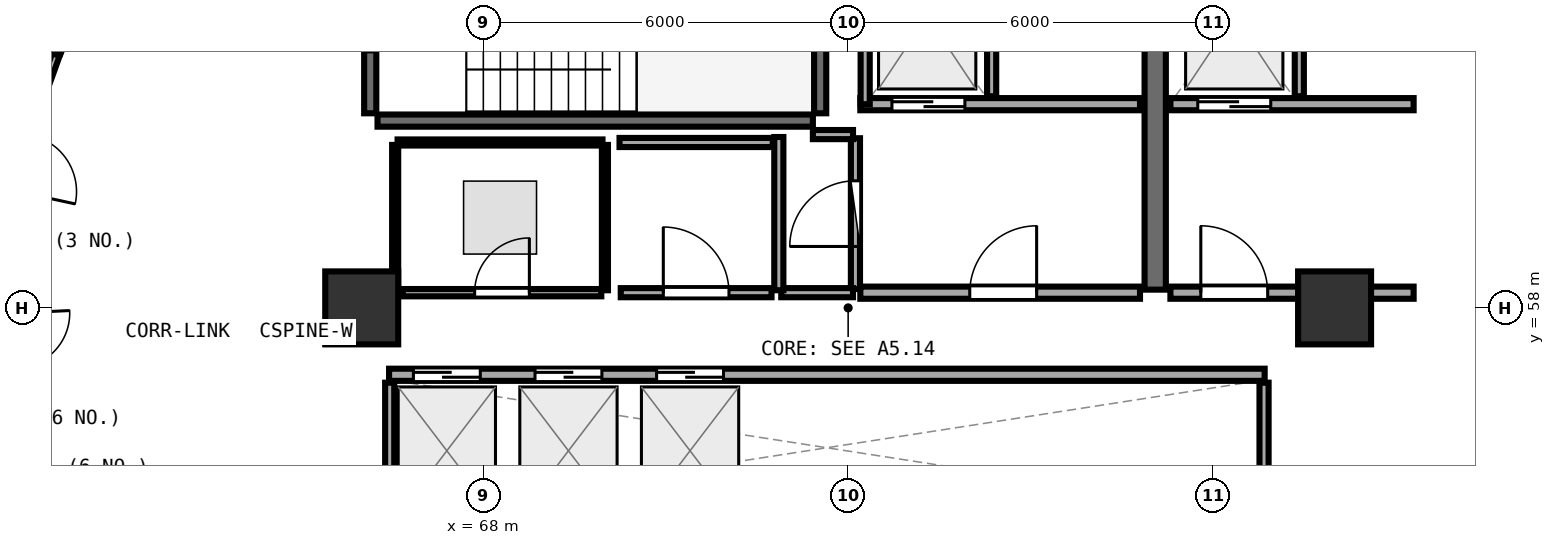
"""IFC4 building model, lengths in metres.
Left out: names, types, materials, properties, quantities, classifications, styles, units other than length and angle.
Written with IfcOpenShell. Run it as: python <this file> out.ifc"""

import sys

from ifc_helpers import new_model, si_unit, direction, frame, frame_2d, origin, origin_2d, place, context, subcontext, project, spatial, rectangle, extrude, element, fill, save


model = new_model("IFC4")
c1 = context("Model", 3, precision=1e-05, world=origin(), true_north=direction((0.0, 1.0)))
c2 = subcontext(c1, "Body", "Model", "MODEL_VIEW")
j1 = project(units=[si_unit("LENGTHUNIT", "METRE"), si_unit("PLANEANGLEUNIT", "RADIAN")], contexts=[c1])
p1 = place(None, origin())
s1 = spatial("IfcSite", under=j1, at=p1, CompositionType="ELEMENT")
p2 = place(p1, origin())
s2 = spatial("IfcBuilding", under=s1, at=p2, CompositionType="ELEMENT")
p3 = place(p2, frame((0.0, 0.0, 161.85)))
s3 = spatial("IfcBuildingStorey", under=s2, at=p3, CompositionType="ELEMENT", Elevation=161.85)
for number, where, z_axis, x_axis in (
    (1, (82.0, 58.0, 0.0), (0.0, 0.0, 1.0), (1.0, 0.0, 0.0)),
    (2, (66.0, 58.0, 0.0), (0.0, 0.0, 1.0), (1.0, 0.0, 0.0)),
):
    element("IfcColumn", number, at=place(p3, frame(where, z_axis=z_axis, x_axis=x_axis)), inside=s3, PredefinedType="PILASTER", context=c2, shape_type="SweptSolid", body=[
        extrude(rectangle(XDim=1.2, YDim=1.2, at=origin_2d()), origin(), (0.0, 0.0, 1.0), 3.75),
    ])
p4 = place(p3, frame((66.26, 61.08, 0.0), z_axis=(0.0, 0.0, 1.0), x_axis=(1.0, 0.0, 0.0)))
e3 = element("IfcWall", 3, at=p4, inside=s3, PredefinedType="SHEAR", context=c2, shape_type="SweptSolid", body=[
    extrude(rectangle(XDim=7.16, YDim=0.2, at=frame_2d((3.58, 0.0))), origin(), (0.0, 0.0, 1.0), 3.49),
])
p5 = place(p3, frame((73.54, 61.2, 0.0), z_axis=(0.0, 0.0, 1.0), x_axis=(0.0, 1.0, 0.0)))
e4 = element("IfcWall", 4, at=p5, inside=s3, PredefinedType="SHEAR", context=c2, shape_type="SweptSolid", body=[
    extrude(rectangle(XDim=3.07, YDim=0.2, at=frame_2d((1.535, 0.0))), origin(), (0.0, 0.0, 1.0), 3.49),
])
p6 = place(p3, frame((66.14, 64.27, 0.0), z_axis=(0.0, 0.0, 1.0), x_axis=(0.0, -1.0, 0.0)))
e5 = element("IfcWall", 5, at=p6, inside=s3, PredefinedType="SHEAR", context=c2, shape_type="SweptSolid", body=[
    extrude(rectangle(XDim=3.07, YDim=0.2, at=frame_2d((1.535, 0.0))), origin(), (0.0, 0.0, 1.0), 3.49),
])
p7 = place(p6, frame((1.01, 0.0, 0.0)))
e6 = element("IfcOpeningElement", 6, at=p7, cuts=e5, PredefinedType="OPENING", context=c2, shape_type="SweptSolid", body=[
    extrude(rectangle(XDim=1.05, YDim=2.1, at=frame_2d((0.525, 1.05))), frame((0.0, 0.11, 0.0), z_axis=(0.0, -1.0, 0.0), x_axis=(1.0, 0.0, 0.0)), (0.0, 0.0, 1.0), 0.22),
])
p8 = place(p3, frame((79.05, 58.3, 0.0), z_axis=(0.0, 0.0, 1.0), x_axis=(0.0, 1.0, 0.0)))
e7 = element("IfcWall", 7, at=p8, inside=s3, PredefinedType="SHEAR", context=c2, shape_type="SweptSolid", body=[
    extrude(rectangle(XDim=6.3, YDim=0.35, at=frame_2d((3.15, 0.0))), origin(), (0.0, 0.0, 1.0), 3.49),
])
p9 = place(p3, frame((74.2, 61.35, 0.0), z_axis=(0.0, 0.0, 1.0), x_axis=(1.0, 0.0, 0.0)))
e8 = element("IfcWall", 8, at=p9, inside=s3, PredefinedType="SOLIDWALL", context=c2, shape_type="SweptSolid", body=[
    extrude(rectangle(XDim=4.6, YDim=0.2, at=frame_2d((2.3, 0.0))), origin(), (0.0, 0.0, 1.0), 3.48),
])
p10 = place(p9, frame((0.52, 0.0, 0.0)))
e9 = element("IfcOpeningElement", 9, at=p10, cuts=e8, PredefinedType="OPENING", context=c2, shape_type="SweptSolid", body=[
    extrude(rectangle(XDim=1.2, YDim=2.15, at=frame_2d((0.6, 1.075))), frame((0.0, 0.11, 0.0), z_axis=(0.0, -1.0, 0.0), x_axis=(1.0, 0.0, 0.0)), (0.0, 0.0, 1.0), 0.22),
])
p11 = place(p3, frame((74.28, 61.35, 0.0), z_axis=(0.0, 0.0, 1.0), x_axis=(0.0, 1.0, 0.0)))
e10 = element("IfcWall", 10, at=p11, inside=s3, PredefinedType="PARTITIONING", context=c2, shape_type="SweptSolid", body=[
    extrude(rectangle(XDim=2.97, YDim=0.15, at=frame_2d((1.485, 0.0))), origin(), (0.0, 0.0, 1.0), 3.48),
])
p12 = place(p3, frame((76.36, 61.48, 0.0), z_axis=(0.0, 0.0, 1.0), x_axis=(0.0, 1.0, 0.0)))
e11 = element("IfcWall", 11, at=p12, inside=s3, PredefinedType="PARTITIONING", context=c2, shape_type="SweptSolid", body=[
    extrude(rectangle(XDim=2.84, YDim=0.15, at=frame_2d((1.42, 0.0))), origin(), (0.0, 0.0, 1.0), 3.48),
])
p13 = place(p3, frame((79.3, 61.35, 0.0), z_axis=(0.0, 0.0, 1.0), x_axis=(1.0, 0.0, 0.0)))
e12 = element("IfcWall", 12, at=p13, inside=s3, PredefinedType="SOLIDWALL", context=c2, shape_type="SweptSolid", body=[
    extrude(rectangle(XDim=4.0, YDim=0.2, at=frame_2d((2.0, 0.0))), origin(), (0.0, 0.0, 1.0), 2.775),
])
p14 = place(p13, frame((0.45, 0.0, 0.0)))
e13 = element("IfcOpeningElement", 13, at=p14, cuts=e12, PredefinedType="OPENING", context=c2, shape_type="SweptSolid", body=[
    extrude(rectangle(XDim=1.2, YDim=2.15, at=frame_2d((0.6, 1.075))), frame((0.0, 0.11, 0.0), z_axis=(0.0, -1.0, 0.0), x_axis=(1.0, 0.0, 0.0)), (0.0, 0.0, 1.0), 0.22),
])
p15 = place(p3, frame((81.42, 61.48, 0.0), z_axis=(0.0, 0.0, 1.0), x_axis=(0.0, 1.0, 0.0)))
e14 = element("IfcWall", 14, at=p15, inside=s3, PredefinedType="PARTITIONING", context=c2, shape_type="SweptSolid", body=[
    extrude(rectangle(XDim=2.84, YDim=0.15, at=frame_2d((1.42, 0.0))), origin(), (0.0, 0.0, 1.0), 3.48),
])
p16 = place(p3, frame((74.2, 58.25, 0.0), z_axis=(0.0, 0.0, 1.0), x_axis=(1.0, 0.0, 0.0)))
e15 = element("IfcWall", 15, at=p16, inside=s3, PredefinedType="SOLIDWALL", context=c2, shape_type="SweptSolid", body=[
    extrude(rectangle(XDim=4.6, YDim=0.2, at=frame_2d((2.3, 0.0))), origin(), (0.0, 0.0, 1.0), 3.48),
])
p17 = place(p16, frame((1.8, 0.0, 0.0)))
e16 = element("IfcOpeningElement", 16, at=p17, cuts=e15, PredefinedType="OPENING", context=c2, shape_type="SweptSolid", body=[
    extrude(rectangle(XDim=1.1, YDim=2.1, at=frame_2d((0.55, 1.05))), frame((0.0, 0.11, 0.0), z_axis=(0.0, -1.0, 0.0), x_axis=(1.0, 0.0, 0.0)), (0.0, 0.0, 1.0), 0.22),
])
p18 = place(p3, frame((79.3, 58.25, 0.0), z_axis=(0.0, 0.0, 1.0), x_axis=(1.0, 0.0, 0.0)))
e17 = element("IfcWall", 17, at=p18, inside=s3, PredefinedType="SOLIDWALL", context=c2, shape_type="SweptSolid", body=[
    extrude(rectangle(XDim=4.0, YDim=0.2, at=frame_2d((2.0, 0.0))), origin(), (0.0, 0.0, 1.0), 2.775),
])
p19 = place(p18, frame((0.5, 0.0, 0.0)))
e18 = element("IfcOpeningElement", 18, at=p19, cuts=e17, PredefinedType="OPENING", context=c2, shape_type="SweptSolid", body=[
    extrude(rectangle(XDim=1.1, YDim=2.1, at=frame_2d((0.55, 1.05))), frame((0.0, 0.11, 0.0), z_axis=(0.0, -1.0, 0.0), x_axis=(1.0, 0.0, 0.0)), (0.0, 0.0, 1.0), 0.22),
])
p20 = place(p3, frame((66.45, 56.9, 0.0), z_axis=(0.0, 0.0, 1.0), x_axis=(1.0, 0.0, 0.0)))
e19 = element("IfcWall", 19, at=p20, inside=s3, PredefinedType="SOLIDWALL", context=c2, shape_type="SweptSolid", body=[
    extrude(rectangle(XDim=14.4, YDim=0.2, at=frame_2d((7.2, 0.0))), origin(), (0.0, 0.0, 1.0), 3.48),
])
p21 = place(p20, frame((0.4, 0.0, 0.0)))
e20 = element("IfcOpeningElement", 20, at=p21, cuts=e19, PredefinedType="OPENING", context=c2, shape_type="SweptSolid", body=[
    extrude(rectangle(XDim=1.1, YDim=2.1, at=frame_2d((0.55, 1.05))), frame((0.0, 0.11, 0.0), z_axis=(0.0, -1.0, 0.0), x_axis=(1.0, 0.0, 0.0)), (0.0, 0.0, 1.0), 0.22),
])
p22 = place(p20, frame((2.4, 0.0, 0.0)))
e21 = element("IfcOpeningElement", 21, at=p22, cuts=e19, PredefinedType="OPENING", context=c2, shape_type="SweptSolid", body=[
    extrude(rectangle(XDim=1.1, YDim=2.1, at=frame_2d((0.55, 1.05))), frame((0.0, 0.11, 0.0), z_axis=(0.0, -1.0, 0.0), x_axis=(1.0, 0.0, 0.0)), (0.0, 0.0, 1.0), 0.22),
])
p23 = place(p20, frame((4.4, 0.0, 0.0)))
e22 = element("IfcOpeningElement", 22, at=p23, cuts=e19, PredefinedType="OPENING", context=c2, shape_type="SweptSolid", body=[
    extrude(rectangle(XDim=1.1, YDim=2.1, at=frame_2d((0.55, 1.05))), frame((0.0, 0.11, 0.0), z_axis=(0.0, -1.0, 0.0), x_axis=(1.0, 0.0, 0.0)), (0.0, 0.0, 1.0), 0.22),
])
for number, where, z_axis, x_axis in (
    (23, (66.46, 54.48, 0.0), (0.0, 0.0, 1.0), (0.0, 1.0, 0.0)),
    (24, (80.84, 54.48, 0.0), (0.0, 0.0, 1.0), (0.0, 1.0, 0.0)),
):
    element("IfcWall", number, at=place(p3, frame(where, z_axis=z_axis, x_axis=x_axis)), inside=s3, PredefinedType="PARTITIONING", context=c2, shape_type="SweptSolid", body=[
        extrude(rectangle(XDim=2.29, YDim=0.15, at=frame_2d((1.145, 0.0))), origin(), (0.0, 0.0, 1.0), 3.48),
    ])
p24 = place(p3, frame((74.12, 58.31, 0.0), z_axis=(0.0, 0.0, 1.0), x_axis=(0.0, 1.0, 0.0)))
e25 = element("IfcWall", 25, at=p24, inside=s3, PredefinedType="PARTITIONING", context=c2, shape_type="SweptSolid", body=[
    extrude(rectangle(XDim=2.48, YDim=0.15, at=frame_2d((1.24, 0.0))), origin(), (0.0, 0.0, 1.0), 3.48),
])
p25 = place(p24, frame((0.7, 0.0, 0.0)))
e26 = element("IfcOpeningElement", 26, at=p25, cuts=e25, PredefinedType="OPENING", context=c2, shape_type="SweptSolid", body=[
    extrude(rectangle(XDim=1.08, YDim=2.1, at=frame_2d((0.54, 1.05))), frame((0.0, 0.085, 0.0), z_axis=(0.0, -1.0, 0.0), x_axis=(1.0, 0.0, 0.0)), (0.0, 0.0, 1.0), 0.17),
])
p26 = place(p3, frame((66.675, 58.25, 0.0), z_axis=(0.0, 0.0, 1.0), x_axis=(1.0, 0.0, 0.0)))
e27 = element("IfcWall", 27, at=p26, inside=s3, PredefinedType="PARTITIONING", context=c2, shape_type="SweptSolid", body=[
    extrude(rectangle(XDim=3.265, YDim=0.12, at=frame_2d((1.632, 0.0))), origin(), (0.0, 0.0, 1.0), 3.48),
])
p27 = place(p26, frame((1.182, 0.0, 0.0)))
e28 = element("IfcOpeningElement", 28, at=p27, cuts=e27, PredefinedType="OPENING", context=c2, shape_type="SweptSolid", body=[
    extrude(rectangle(XDim=0.9, YDim=2.08, at=frame_2d((0.45, 1.04))), frame((0.0, 0.07, 0.0), z_axis=(0.0, -1.0, 0.0), x_axis=(1.0, 0.0, 0.0)), (0.0, 0.0, 1.0), 0.14),
])
p28 = place(p3, frame((70.26, 58.25, 0.0), z_axis=(0.0, 0.0, 1.0), x_axis=(1.0, 0.0, 0.0)))
e29 = element("IfcWall", 29, at=p28, inside=s3, PredefinedType="PARTITIONING", context=c2, shape_type="SweptSolid", body=[
    extrude(rectangle(XDim=2.48, YDim=0.15, at=frame_2d((1.24, 0.0))), origin(), (0.0, 0.0, 1.0), 3.48),
])
p29 = place(p28, frame((0.7, 0.0, 0.0)))
e30 = element("IfcOpeningElement", 30, at=p29, cuts=e29, PredefinedType="OPENING", context=c2, shape_type="SweptSolid", body=[
    extrude(rectangle(XDim=1.08, YDim=2.1, at=frame_2d((0.54, 1.05))), frame((0.0, 0.085, 0.0), z_axis=(0.0, -1.0, 0.0), x_axis=(1.0, 0.0, 0.0)), (0.0, 0.0, 1.0), 0.17),
])
p30 = place(p3, frame((72.9, 58.25, 0.0), z_axis=(0.0, 0.0, 1.0), x_axis=(1.0, 0.0, 0.0)))
e31 = element("IfcWall", 31, at=p30, inside=s3, PredefinedType="PARTITIONING", context=c2, shape_type="SweptSolid", body=[
    extrude(rectangle(XDim=1.18, YDim=0.15, at=frame_2d((0.59, 0.0))), origin(), (0.0, 0.0, 1.0), 3.48),
])
p31 = place(p3, frame((74.08, 60.85, 0.0), z_axis=(0.0, 0.0, 1.0), x_axis=(-1.0, 0.0, 0.0)))
e32 = element("IfcWall", 32, at=p31, inside=s3, PredefinedType="PARTITIONING", context=c2, shape_type="SweptSolid", body=[
    extrude(rectangle(XDim=0.66, YDim=0.15, at=frame_2d((0.33, 0.0))), origin(), (0.0, 0.0, 1.0), 3.48),
])
p32 = place(p3, frame((72.86, 60.81, 0.0), z_axis=(0.0, 0.0, 1.0), x_axis=(0.0, -1.0, 0.0)))
e33 = element("IfcWall", 33, at=p32, inside=s3, PredefinedType="PARTITIONING", context=c2, shape_type="SweptSolid", body=[
    extrude(rectangle(XDim=2.52, YDim=0.15, at=frame_2d((1.26, 0.0))), origin(), (0.0, 0.0, 1.0), 3.48),
])
p33 = place(p3, frame((70.0, 58.29, 0.0), z_axis=(0.0, 0.0, 1.0), x_axis=(0.0, 1.0, 0.0)))
e34 = element("IfcWall", 34, at=p33, inside=s3, PredefinedType="PARTITIONING", context=c2, shape_type="SweptSolid", body=[
    extrude(rectangle(XDim=2.39, YDim=0.1, at=frame_2d((1.195, 0.0))), origin(), (0.0, 0.0, 1.0), 3.48),
])
p34 = place(p3, frame((69.96, 60.72, 0.0), z_axis=(0.0, 0.0, 1.0), x_axis=(-1.0, 0.0, 0.0)))
e35 = element("IfcWall", 35, at=p34, inside=s3, PredefinedType="PARTITIONING", context=c2, shape_type="SweptSolid", body=[
    extrude(rectangle(XDim=3.37, YDim=0.1, at=frame_2d((1.685, 0.0))), origin(), (0.0, 0.0, 1.0), 3.48),
])
p35 = place(p3, frame((66.55, 60.68, 0.0), z_axis=(0.0, 0.0, 1.0), x_axis=(0.0, -1.0, 0.0)))
e36 = element("IfcWall", 36, at=p35, inside=s3, PredefinedType="PARTITIONING", context=c2, shape_type="SweptSolid", body=[
    extrude(rectangle(XDim=2.383, YDim=0.1, at=frame_2d((1.191, 0.0))), origin(), (0.0, 0.0, 1.0), 3.48),
])
p36 = place(p3, frame((72.76, 60.72, 0.0), z_axis=(0.0, 0.0, 1.0), x_axis=(-1.0, 0.0, 0.0)))
e37 = element("IfcWall", 37, at=p36, inside=s3, PredefinedType="PARTITIONING", context=c2, shape_type="SweptSolid", body=[
    extrude(rectangle(XDim=2.52, YDim=0.15, at=frame_2d((1.26, 0.0))), origin(), (0.0, 0.0, 1.0), 3.48),
])
p37 = place(p3, frame((61.268, 62.853, 0.0), z_axis=(0.0, 0.0, 1.0), x_axis=(-0.398284741881, -0.917261829787, 0.0)))
e38 = element("IfcWall", 38, at=p37, inside=s3, PredefinedType="PLUMBINGWALL", context=c2, shape_type="SweptSolid", body=[
    extrude(rectangle(XDim=0.708, YDim=0.13, at=frame_2d((0.354, 0.0))), origin(), (0.0, 0.0, 1.0), 3.235),
])
p38 = place(p3, frame((60.971, 62.166, 0.0), z_axis=(0.0, 0.0, 1.0), x_axis=(-0.340044773791, -0.940409246987, 0.0)))
e39 = element("IfcWall", 39, at=p38, inside=s3, PredefinedType="PLUMBINGWALL", context=c2, shape_type="SweptSolid", body=[
    extrude(rectangle(XDim=0.704, YDim=0.13, at=frame_2d((0.352, 0.0))), origin(), (0.0, 0.0, 1.0), 3.235),
])
p39 = place(p10, origin())
e40 = element("IfcDoor", 40, at=p39, inside=s3, OperationType="DOUBLE_DOOR_SLIDING", PredefinedType="DOOR", context=c2, shape_type="SweptSolid", body=[
    extrude(rectangle(XDim=1.2, YDim=2.15, at=frame_2d((0.6, 1.075))), frame((0.0, 0.025, 0.0), z_axis=(0.0, -1.0, 0.0), x_axis=(1.0, 0.0, 0.0)), (0.0, 0.0, 1.0), 0.05),
])
fill(e9, e40)
p40 = place(p14, origin())
e41 = element("IfcDoor", 41, at=p40, inside=s3, OperationType="DOUBLE_DOOR_SLIDING", PredefinedType="DOOR", context=c2, shape_type="SweptSolid", body=[
    extrude(rectangle(XDim=1.2, YDim=2.15, at=frame_2d((0.6, 1.075))), frame((0.0, 0.025, 0.0), z_axis=(0.0, -1.0, 0.0), x_axis=(1.0, 0.0, 0.0)), (0.0, 0.0, 1.0), 0.05),
])
fill(e13, e41)
p41 = place(p17, frame((1.1, 0.0, 0.0), z_axis=(0.0, 0.0, 1.0), x_axis=(-1.0, 0.0, 0.0)))
e42 = element("IfcDoor", 42, at=p41, inside=s3, OperationType="SINGLE_SWING_LEFT", PredefinedType="DOOR", context=c2, shape_type="SweptSolid", body=[
    extrude(rectangle(XDim=1.1, YDim=2.1, at=frame_2d((0.55, 1.05))), frame((0.0, 0.025, 0.0), z_axis=(0.0, -1.0, 0.0), x_axis=(1.0, 0.0, 0.0)), (0.0, 0.0, 1.0), 0.05),
])
fill(e16, e42)
p42 = place(p19, frame((1.1, 0.0, 0.0), z_axis=(0.0, 0.0, 1.0), x_axis=(-1.0, 0.0, 0.0)))
e43 = element("IfcDoor", 43, at=p42, inside=s3, OperationType="SINGLE_SWING_RIGHT", PredefinedType="DOOR", context=c2, shape_type="SweptSolid", body=[
    extrude(rectangle(XDim=1.1, YDim=2.1, at=frame_2d((0.55, 1.05))), frame((0.0, 0.025, 0.0), z_axis=(0.0, -1.0, 0.0), x_axis=(1.0, 0.0, 0.0)), (0.0, 0.0, 1.0), 0.05),
])
fill(e18, e43)
p43 = place(p21, origin())
e44 = element("IfcDoor", 44, at=p43, inside=s3, OperationType="DOUBLE_DOOR_SLIDING", PredefinedType="DOOR", context=c2, shape_type="SweptSolid", body=[
    extrude(rectangle(XDim=1.1, YDim=2.1, at=frame_2d((0.55, 1.05))), frame((0.0, 0.025, 0.0), z_axis=(0.0, -1.0, 0.0), x_axis=(1.0, 0.0, 0.0)), (0.0, 0.0, 1.0), 0.05),
])
fill(e20, e44)
p44 = place(p22, origin())
e45 = element("IfcDoor", 45, at=p44, inside=s3, OperationType="DOUBLE_DOOR_SLIDING", PredefinedType="DOOR", context=c2, shape_type="SweptSolid", body=[
    extrude(rectangle(XDim=1.1, YDim=2.1, at=frame_2d((0.55, 1.05))), frame((0.0, 0.025, 0.0), z_axis=(0.0, -1.0, 0.0), x_axis=(1.0, 0.0, 0.0)), (0.0, 0.0, 1.0), 0.05),
])
fill(e21, e45)
p45 = place(p23, origin())
e46 = element("IfcDoor", 46, at=p45, inside=s3, OperationType="DOUBLE_DOOR_SLIDING", PredefinedType="DOOR", context=c2, shape_type="SweptSolid", body=[
    extrude(rectangle(XDim=1.1, YDim=2.1, at=frame_2d((0.55, 1.05))), frame((0.0, 0.025, 0.0), z_axis=(0.0, -1.0, 0.0), x_axis=(1.0, 0.0, 0.0)), (0.0, 0.0, 1.0), 0.05),
])
fill(e22, e46)
p46 = place(p25, origin())
e47 = element("IfcDoor", 47, at=p46, inside=s3, OperationType="SINGLE_SWING_LEFT", PredefinedType="DOOR", context=c2, shape_type="SweptSolid", body=[
    extrude(rectangle(XDim=1.08, YDim=2.1, at=frame_2d((0.54, 1.05))), frame((0.0, 0.025, 0.0), z_axis=(0.0, -1.0, 0.0), x_axis=(1.0, 0.0, 0.0)), (0.0, 0.0, 1.0), 0.05),
])
fill(e26, e47)
p47 = place(p27, origin())
e48 = element("IfcDoor", 48, at=p47, inside=s3, OperationType="SINGLE_SWING_RIGHT", PredefinedType="DOOR", context=c2, shape_type="SweptSolid", body=[
    extrude(rectangle(XDim=0.9, YDim=2.08, at=frame_2d((0.45, 1.04))), frame((0.0, 0.025, 0.0), z_axis=(0.0, -1.0, 0.0), x_axis=(1.0, 0.0, 0.0)), (0.0, 0.0, 1.0), 0.05),
])
fill(e28, e48)
p48 = place(p29, origin())
e49 = element("IfcDoor", 49, at=p48, inside=s3, OperationType="SINGLE_SWING_LEFT", PredefinedType="DOOR", context=c2, shape_type="SweptSolid", body=[
    extrude(rectangle(XDim=1.08, YDim=2.1, at=frame_2d((0.54, 1.05))), frame((0.0, 0.025, 0.0), z_axis=(0.0, -1.0, 0.0), x_axis=(1.0, 0.0, 0.0)), (0.0, 0.0, 1.0), 0.05),
])
fill(e30, e49)
save(model, sys.argv[1])
